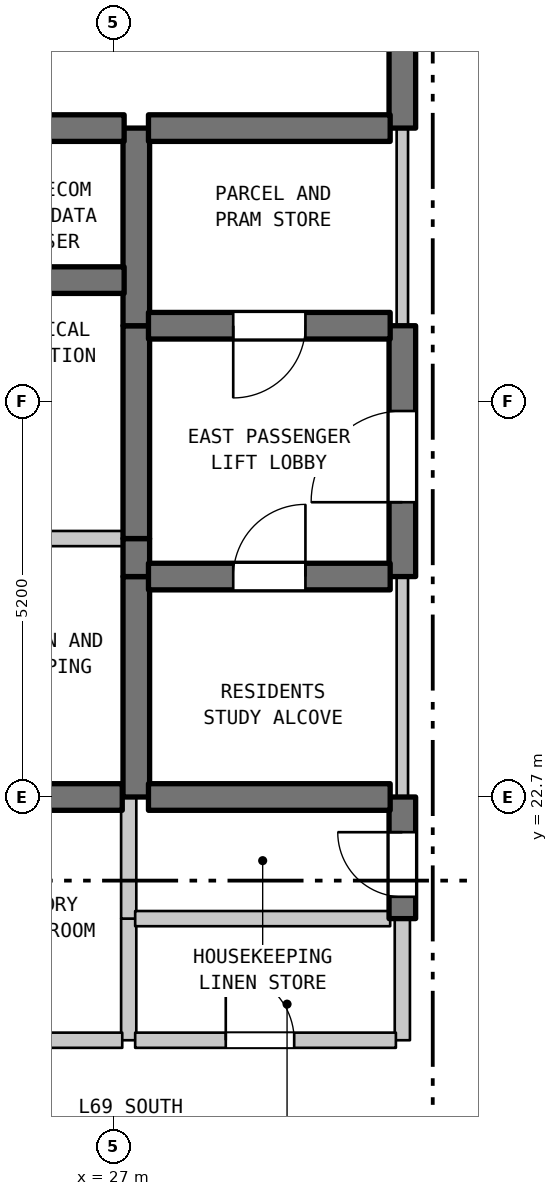
"""IFC4 building model, lengths in metres.
Left out: names, types, materials, properties, quantities, classifications, styles, units other than length and angle.
Written with IfcOpenShell. Run it as: python <this file> out.ifc"""

import sys

from ifc_helpers import new_model, si_unit, direction, frame, frame_2d, origin, place, context, subcontext, project, spatial, rectangle, extrude, element, fill, save


model = new_model("IFC4")
c1 = context("Model", 3, precision=1e-05, world=origin(), true_north=direction((0.0, 1.0)))
c2 = subcontext(c1, "Body", "Model", "MODEL_VIEW")
j1 = project(units=[si_unit("LENGTHUNIT", "METRE"), si_unit("PLANEANGLEUNIT", "RADIAN")], contexts=[c1])
p1 = place(None, origin())
s1 = spatial("IfcSite", under=j1, at=p1, CompositionType="ELEMENT")
p2 = place(p1, origin())
s2 = spatial("IfcBuilding", under=s1, at=p2, CompositionType="ELEMENT")
p3 = place(p2, frame((0.0, 0.0, 276.9)))
s3 = spatial("IfcBuildingStorey", under=s2, at=p3, CompositionType="ELEMENT", Elevation=276.9)
p4 = place(p3, frame((27.2, 19.5, 0.0), z_axis=(0.0, 0.0, 1.0), x_axis=(0.0, 1.0, 0.0)))
e1 = element("IfcWall", 1, at=p4, inside=s3, PredefinedType="STANDARD", context=c2, shape_type="SweptSolid", body=[
    extrude(rectangle(XDim=1.6, YDim=0.2, at=frame_2d((0.8, 0.0))), origin(), (0.0, 0.0, 1.0), 3.39),
])
p5 = place(p3, frame((27.2, 21.1, 0.0), z_axis=(0.0, 0.0, 1.0), x_axis=(0.0, 1.0, 0.0)))
e2 = element("IfcWall", 2, at=p5, inside=s3, PredefinedType="STANDARD", context=c2, shape_type="SweptSolid", body=[
    extrude(rectangle(XDim=1.6, YDim=0.2, at=frame_2d((0.8, 0.0))), origin(), (0.0, 0.0, 1.0), 3.39),
])
p6 = place(p3, frame((27.3, 22.7, 0.0), z_axis=(0.0, 0.0, 1.0), x_axis=(0.0, 1.0, 0.0)))
e3 = element("IfcWall", 3, at=p6, inside=s3, PredefinedType="SHEAR", context=c2, shape_type="SweptSolid", body=[
    extrude(rectangle(XDim=2.9, YDim=0.35, at=frame_2d((1.45, 0.0))), origin(), (0.0, 0.0, 1.0), 3.39),
])
p7 = place(p3, frame((27.3, 25.6, 0.0), z_axis=(0.0, 0.0, 1.0), x_axis=(0.0, 1.0, 0.0)))
e4 = element("IfcWall", 4, at=p7, inside=s3, PredefinedType="SHEAR", context=c2, shape_type="SweptSolid", body=[
    extrude(rectangle(XDim=0.5, YDim=0.35, at=frame_2d((0.25, 0.0))), origin(), (0.0, 0.0, 1.0), 3.39),
])
p8 = place(p3, frame((27.3, 26.1, 0.0), z_axis=(0.0, 0.0, 1.0), x_axis=(0.0, 1.0, 0.0)))
e5 = element("IfcWall", 5, at=p8, inside=s3, PredefinedType="SHEAR", context=c2, shape_type="SweptSolid", body=[
    extrude(rectangle(XDim=2.8, YDim=0.35, at=frame_2d((1.4, 0.0))), origin(), (0.0, 0.0, 1.0), 3.39),
])
p9 = place(p3, frame((27.3, 28.9, 0.0), z_axis=(0.0, 0.0, 1.0), x_axis=(0.0, 1.0, 0.0)))
e6 = element("IfcWall", 6, at=p9, inside=s3, PredefinedType="SHEAR", context=c2, shape_type="SweptSolid", body=[
    extrude(rectangle(XDim=2.6, YDim=0.35, at=frame_2d((1.3, 0.0))), origin(), (0.0, 0.0, 1.0), 3.39),
])
p10 = place(p3, frame((30.8, 19.5, 0.0), z_axis=(0.0, 0.0, 1.0), x_axis=(0.0, 1.0, 0.0)))
e7 = element("IfcWall", 7, at=p10, inside=s3, PredefinedType="STANDARD", context=c2, shape_type="SweptSolid", body=[
    extrude(rectangle(XDim=1.6, YDim=0.2, at=frame_2d((0.8, 0.0))), origin(), (0.0, 0.0, 1.0), 3.39),
])
p11 = place(p3, frame((30.8, 21.1, 0.0), z_axis=(0.0, 0.0, 1.0), x_axis=(0.0, 1.0, 0.0)))
e8 = element("IfcWall", 8, at=p11, inside=s3, PredefinedType="SHEAR", context=c2, shape_type="SweptSolid", body=[
    extrude(rectangle(XDim=1.6, YDim=0.35, at=frame_2d((0.8, 0.0))), origin(), (0.0, 0.0, 1.0), 3.39),
])
p12 = place(p11, frame((0.287, 0.0, 0.0)))
e9 = element("IfcOpeningElement", 9, at=p12, cuts=e8, PredefinedType="OPENING", context=c2, shape_type="SweptSolid", body=[
    extrude(rectangle(XDim=0.85, YDim=2.1, at=frame_2d((0.425, 1.05))), frame((0.0, 0.185, 0.0), z_axis=(0.0, -1.0, 0.0), x_axis=(1.0, 0.0, 0.0)), (0.0, 0.0, 1.0), 0.37),
])
p13 = place(p3, frame((30.8, 22.7, 0.0), z_axis=(0.0, 0.0, 1.0), x_axis=(0.0, 1.0, 0.0)))
e10 = element("IfcWall", 10, at=p13, inside=s3, PredefinedType="STANDARD", context=c2, shape_type="SweptSolid", body=[
    extrude(rectangle(XDim=2.9, YDim=0.15, at=frame_2d((1.45, 0.0))), origin(), (0.0, 0.0, 1.0), 3.39),
])
p14 = place(p3, frame((30.8, 25.6, 0.0), z_axis=(0.0, 0.0, 1.0), x_axis=(0.0, 1.0, 0.0)))
e11 = element("IfcWall", 11, at=p14, inside=s3, PredefinedType="SHEAR", context=c2, shape_type="SweptSolid", body=[
    extrude(rectangle(XDim=3.3, YDim=0.35, at=frame_2d((1.65, 0.0))), origin(), (0.0, 0.0, 1.0), 3.39),
])
p15 = place(p14, frame((0.978, 0.0, 0.0)))
e12 = element("IfcOpeningElement", 12, at=p15, cuts=e11, PredefinedType="OPENING", context=c2, shape_type="SweptSolid", body=[
    extrude(rectangle(XDim=1.2, YDim=2.2, at=frame_2d((0.6, 1.1))), frame((0.0, 0.185, 0.0), z_axis=(0.0, -1.0, 0.0), x_axis=(1.0, 0.0, 0.0)), (0.0, 0.0, 1.0), 0.37),
])
p16 = place(p3, frame((30.8, 28.9, 0.0), z_axis=(0.0, 0.0, 1.0), x_axis=(0.0, 1.0, 0.0)))
e13 = element("IfcWall", 13, at=p16, inside=s3, PredefinedType="STANDARD", context=c2, shape_type="SweptSolid", body=[
    extrude(rectangle(XDim=2.6, YDim=0.15, at=frame_2d((1.3, 0.0))), origin(), (0.0, 0.0, 1.0), 3.39),
])
p17 = place(p3, frame((30.8, 31.5, 0.0), z_axis=(0.0, 0.0, 1.0), x_axis=(0.0, 1.0, 0.0)))
e14 = element("IfcWall", 14, at=p17, inside=s3, PredefinedType="SHEAR", context=c2, shape_type="SweptSolid", body=[
    extrude(rectangle(XDim=3.5, YDim=0.35, at=frame_2d((1.75, 0.0))), origin(), (0.0, 0.0, 1.0), 3.39),
])
p18 = place(p17, frame((1.15, 0.0, 0.0)))
e15 = element("IfcOpeningElement", 15, at=p18, cuts=e14, PredefinedType="OPENING", context=c2, shape_type="SweptSolid", body=[
    extrude(rectangle(XDim=1.2, YDim=2.2, at=frame_2d((0.6, 1.1))), frame((0.0, 0.185, 0.0), z_axis=(0.0, -1.0, 0.0), x_axis=(1.0, 0.0, 0.0)), (0.0, 0.0, 1.0), 0.37),
])
p19 = place(p3, frame((23.96, 19.5, 0.0), z_axis=(0.0, 0.0, 1.0), x_axis=(1.0, 0.0, 0.0)))
e16 = element("IfcWall", 16, at=p19, inside=s3, PredefinedType="STANDARD", context=c2, shape_type="SweptSolid", body=[
    extrude(rectangle(XDim=3.155, YDim=0.2, at=frame_2d((1.578, 0.0))), origin(), (0.0, 0.0, 1.0), 3.39),
])
p20 = place(p19, frame((0.991, 0.0, 0.0)))
e17 = element("IfcOpeningElement", 17, at=p20, cuts=e16, PredefinedType="OPENING", context=c2, shape_type="SweptSolid", body=[
    extrude(rectangle(XDim=0.95, YDim=2.15, at=frame_2d((0.475, 1.075))), frame((0.0, 0.11, 0.0), z_axis=(0.0, -1.0, 0.0), x_axis=(1.0, 0.0, 0.0)), (0.0, 0.0, 1.0), 0.22),
])
p21 = place(p3, frame((27.285, 19.5, 0.0), z_axis=(0.0, 0.0, 1.0), x_axis=(1.0, 0.0, 0.0)))
e18 = element("IfcWall", 18, at=p21, inside=s3, PredefinedType="STANDARD", context=c2, shape_type="SweptSolid", body=[
    extrude(rectangle(XDim=3.43, YDim=0.2, at=frame_2d((1.715, 0.0))), origin(), (0.0, 0.0, 1.0), 3.39),
])
p22 = place(p21, frame((1.192, 0.0, 0.0)))
e19 = element("IfcOpeningElement", 19, at=p22, cuts=e18, PredefinedType="OPENING", context=c2, shape_type="SweptSolid", body=[
    extrude(rectangle(XDim=0.9, YDim=2.15, at=frame_2d((0.45, 1.075))), frame((0.0, 0.11, 0.0), z_axis=(0.0, -1.0, 0.0), x_axis=(1.0, 0.0, 0.0)), (0.0, 0.0, 1.0), 0.22),
])
p23 = place(p3, frame((27.285, 21.1, 0.0), z_axis=(0.0, 0.0, 1.0), x_axis=(1.0, 0.0, 0.0)))
e20 = element("IfcWall", 20, at=p23, inside=s3, PredefinedType="STANDARD", context=c2, shape_type="SweptSolid", body=[
    extrude(rectangle(XDim=3.355, YDim=0.2, at=frame_2d((1.677, 0.0))), origin(), (0.0, 0.0, 1.0), 3.39),
])
p24 = place(p3, frame((23.96, 22.7, 0.0), z_axis=(0.0, 0.0, 1.0), x_axis=(1.0, 0.0, 0.0)))
e21 = element("IfcWall", 21, at=p24, inside=s3, PredefinedType="SHEAR", context=c2, shape_type="SweptSolid", body=[
    extrude(rectangle(XDim=3.155, YDim=0.35, at=frame_2d((1.578, 0.0))), origin(), (0.0, 0.0, 1.0), 3.39),
])
p25 = place(p3, frame((27.46, 22.7, 0.0), z_axis=(0.0, 0.0, 1.0), x_axis=(1.0, 0.0, 0.0)))
e22 = element("IfcWall", 22, at=p25, inside=s3, PredefinedType="SHEAR", context=c2, shape_type="SweptSolid", body=[
    extrude(rectangle(XDim=3.18, YDim=0.35, at=frame_2d((1.59, 0.0))), origin(), (0.0, 0.0, 1.0), 3.39),
])
p26 = place(p3, frame((27.46, 25.6, 0.0), z_axis=(0.0, 0.0, 1.0), x_axis=(1.0, 0.0, 0.0)))
e23 = element("IfcWall", 23, at=p26, inside=s3, PredefinedType="SHEAR", context=c2, shape_type="SweptSolid", body=[
    extrude(rectangle(XDim=3.18, YDim=0.35, at=frame_2d((1.59, 0.0))), origin(), (0.0, 0.0, 1.0), 3.39),
])
p27 = place(p26, frame((1.115, 0.0, 0.0)))
e24 = element("IfcOpeningElement", 24, at=p27, cuts=e23, PredefinedType="OPENING", context=c2, shape_type="SweptSolid", body=[
    extrude(rectangle(XDim=0.95, YDim=2.15, at=frame_2d((0.475, 1.075))), frame((0.0, 0.185, 0.0), z_axis=(0.0, -1.0, 0.0), x_axis=(1.0, 0.0, 0.0)), (0.0, 0.0, 1.0), 0.37),
])
p28 = place(p3, frame((23.96, 26.1, 0.0), z_axis=(0.0, 0.0, 1.0), x_axis=(1.0, 0.0, 0.0)))
e25 = element("IfcWall", 25, at=p28, inside=s3, PredefinedType="STANDARD", context=c2, shape_type="SweptSolid", body=[
    extrude(rectangle(XDim=3.18, YDim=0.2, at=frame_2d((1.59, 0.0))), origin(), (0.0, 0.0, 1.0), 3.39),
])
p29 = place(p3, frame((27.46, 28.9, 0.0), z_axis=(0.0, 0.0, 1.0), x_axis=(1.0, 0.0, 0.0)))
e26 = element("IfcWall", 26, at=p29, inside=s3, PredefinedType="SHEAR", context=c2, shape_type="SweptSolid", body=[
    extrude(rectangle(XDim=3.18, YDim=0.35, at=frame_2d((1.59, 0.0))), origin(), (0.0, 0.0, 1.0), 3.39),
])
p30 = place(p29, frame((1.115, 0.0, 0.0)))
e27 = element("IfcOpeningElement", 27, at=p30, cuts=e26, PredefinedType="OPENING", context=c2, shape_type="SweptSolid", body=[
    extrude(rectangle(XDim=0.95, YDim=2.15, at=frame_2d((0.475, 1.075))), frame((0.0, 0.185, 0.0), z_axis=(0.0, -1.0, 0.0), x_axis=(1.0, 0.0, 0.0)), (0.0, 0.0, 1.0), 0.37),
])
p31 = place(p3, frame((23.96, 29.5, 0.0), z_axis=(0.0, 0.0, 1.0), x_axis=(1.0, 0.0, 0.0)))
e28 = element("IfcWall", 28, at=p31, inside=s3, PredefinedType="SHEAR", context=c2, shape_type="SweptSolid", body=[
    extrude(rectangle(XDim=3.18, YDim=0.35, at=frame_2d((1.59, 0.0))), origin(), (0.0, 0.0, 1.0), 3.39),
])
p32 = place(p3, frame((23.96, 31.5, 0.0), z_axis=(0.0, 0.0, 1.0), x_axis=(1.0, 0.0, 0.0)))
e29 = element("IfcWall", 29, at=p32, inside=s3, PredefinedType="SHEAR", context=c2, shape_type="SweptSolid", body=[
    extrude(rectangle(XDim=3.18, YDim=0.35, at=frame_2d((1.59, 0.0))), origin(), (0.0, 0.0, 1.0), 3.39),
])
p33 = place(p32, frame((1.094, 0.0, 0.0)))
e30 = element("IfcOpeningElement", 30, at=p33, cuts=e29, PredefinedType="OPENING", context=c2, shape_type="SweptSolid", body=[
    extrude(rectangle(XDim=0.85, YDim=2.1, at=frame_2d((0.425, 1.05))), frame((0.0, 0.185, 0.0), z_axis=(0.0, -1.0, 0.0), x_axis=(1.0, 0.0, 0.0)), (0.0, 0.0, 1.0), 0.37),
])
p34 = place(p3, frame((27.46, 31.5, 0.0), z_axis=(0.0, 0.0, 1.0), x_axis=(1.0, 0.0, 0.0)))
e31 = element("IfcWall", 31, at=p34, inside=s3, PredefinedType="SHEAR", context=c2, shape_type="SweptSolid", body=[
    extrude(rectangle(XDim=3.18, YDim=0.35, at=frame_2d((1.59, 0.0))), origin(), (0.0, 0.0, 1.0), 3.39),
])
p35 = place(p12, origin())
e32 = element("IfcDoor", 32, at=p35, inside=s3, OperationType="SINGLE_SWING_RIGHT", PredefinedType="DOOR", context=c2, shape_type="SweptSolid", body=[
    extrude(rectangle(XDim=0.85, YDim=2.1, at=frame_2d((0.425, 1.05))), frame((0.0, 0.025, 0.0), z_axis=(0.0, -1.0, 0.0), x_axis=(1.0, 0.0, 0.0)), (0.0, 0.0, 1.0), 0.05),
])
fill(e9, e32)
p36 = place(p15, origin())
e33 = element("IfcDoor", 33, at=p36, inside=s3, OperationType="SINGLE_SWING_LEFT", PredefinedType="DOOR", context=c2, shape_type="SweptSolid", body=[
    extrude(rectangle(XDim=1.2, YDim=2.2, at=frame_2d((0.6, 1.1))), frame((0.0, 0.025, 0.0), z_axis=(0.0, -1.0, 0.0), x_axis=(1.0, 0.0, 0.0)), (0.0, 0.0, 1.0), 0.05),
])
fill(e12, e33)
p37 = place(p22, origin())
e34 = element("IfcDoor", 34, at=p37, inside=s3, OperationType="SINGLE_SWING_LEFT", PredefinedType="DOOR", context=c2, shape_type="SweptSolid", body=[
    extrude(rectangle(XDim=0.9, YDim=2.15, at=frame_2d((0.45, 1.075))), frame((0.0, 0.025, 0.0), z_axis=(0.0, -1.0, 0.0), x_axis=(1.0, 0.0, 0.0)), (0.0, 0.0, 1.0), 0.05),
])
fill(e19, e34)
p38 = place(p27, origin())
e35 = element("IfcDoor", 35, at=p38, inside=s3, OperationType="SINGLE_SWING_RIGHT", PredefinedType="DOOR", context=c2, shape_type="SweptSolid", body=[
    extrude(rectangle(XDim=0.95, YDim=2.15, at=frame_2d((0.475, 1.075))), frame((0.0, 0.025, 0.0), z_axis=(0.0, -1.0, 0.0), x_axis=(1.0, 0.0, 0.0)), (0.0, 0.0, 1.0), 0.05),
])
fill(e24, e35)
p39 = place(p30, frame((0.95, 0.0, 0.0), z_axis=(0.0, 0.0, 1.0), x_axis=(-1.0, 0.0, 0.0)))
e36 = element("IfcDoor", 36, at=p39, inside=s3, OperationType="SINGLE_SWING_LEFT", PredefinedType="DOOR", context=c2, shape_type="SweptSolid", body=[
    extrude(rectangle(XDim=0.95, YDim=2.15, at=frame_2d((0.475, 1.075))), frame((0.0, 0.025, 0.0), z_axis=(0.0, -1.0, 0.0), x_axis=(1.0, 0.0, 0.0)), (0.0, 0.0, 1.0), 0.05),
])
fill(e27, e36)
save(model, sys.argv[1])
